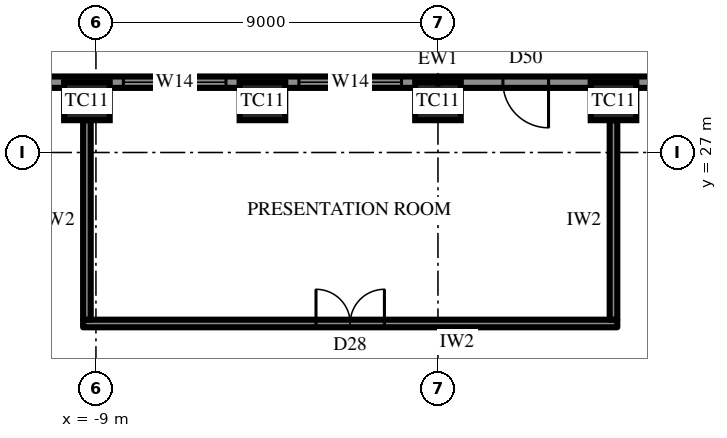
"""IFC4 building model, lengths in metres.
Left out: names, types, materials, properties, quantities, classifications, styles, units other than length and angle.
Written with IfcOpenShell. Run it as: python <this file> out.ifc"""

import sys

from ifc_helpers import new_model, si_unit, direction, frame, frame_2d, origin, origin_2d, place, context, subcontext, project, spatial, rectangle, extrude, element, fill, save


model = new_model("IFC4")
c1 = context("Model", 3, precision=1e-05, world=origin(), true_north=direction((0.0, 1.0)))
c2 = subcontext(c1, "Body", "Model", "MODEL_VIEW")
j1 = project(units=[si_unit("LENGTHUNIT", "METRE"), si_unit("PLANEANGLEUNIT", "RADIAN")], contexts=[c1])
p1 = place(None, origin())
s1 = spatial("IfcSite", under=j1, at=p1, CompositionType="ELEMENT")
p2 = place(p1, origin())
s2 = spatial("IfcBuilding", under=s1, at=p2, CompositionType="ELEMENT")
p3 = place(p2, frame((0.0, 0.0, 274.3)))
s3 = spatial("IfcBuildingStorey", under=s2, at=p3, CompositionType="ELEMENT", Elevation=274.3)
for number, where, z_axis, x_axis in (
    (1, (4.619, 28.35, 0.0), (0.0, 0.0, 1.0), (-1.0, 0.0, 0.0)),
    (2, (0.0, 28.35, 0.0), (0.0, 0.0, 1.0), (-1.0, 0.0, 0.0)),
    (3, (-4.619, 28.35, 0.0), (0.0, 0.0, 1.0), (-1.0, 0.0, 0.0)),
    (4, (-9.238, 28.35, 0.0), (0.0, 0.0, 1.0), (-1.0, 0.0, 0.0)),
):
    element("IfcColumn", number, at=place(p3, frame(where, z_axis=z_axis, x_axis=x_axis)), inside=s3, PredefinedType="COLUMN", context=c2, shape_type="SweptSolid", body=[
        extrude(rectangle(XDim=1.2, YDim=1.0, at=origin_2d()), origin(), (0.0, 0.0, 1.0), 4.2),
    ])
p4 = place(p3, frame((12.556, 28.85, 0.0), z_axis=(0.0, 0.0, 1.0), x_axis=(-1.0, 0.0, 0.0)))
e5 = element("IfcWall", 5, at=p4, inside=s3, PredefinedType="SOLIDWALL", context=c2, shape_type="SweptSolid", body=[
    extrude(rectangle(XDim=25.113, YDim=0.3, at=frame_2d((12.556, 0.0))), origin(), (0.0, 0.0, 1.0), 2.8),
])
p5 = place(p4, frame((4.278, 0.0, 0.6)))
e6 = element("IfcOpeningElement", 6, at=p5, cuts=e5, PredefinedType="OPENING", context=c2, shape_type="SweptSolid", body=[
    extrude(rectangle(XDim=2.7, YDim=1.95, at=frame_2d((1.35, 0.975))), frame((0.0, 0.16, 0.0), z_axis=(0.0, -1.0, 0.0), x_axis=(1.0, 0.0, 0.0)), (0.0, 0.0, 1.0), 0.32),
])
p6 = place(p4, frame((9.647, 0.0, 0.0)))
e7 = element("IfcOpeningElement", 7, at=p6, cuts=e5, PredefinedType="OPENING", context=c2, shape_type="SweptSolid", body=[
    extrude(rectangle(XDim=1.2, YDim=2.4, at=frame_2d((0.6, 1.2))), frame((0.0, 0.16, 0.0), z_axis=(0.0, -1.0, 0.0), x_axis=(1.0, 0.0, 0.0)), (0.0, 0.0, 1.0), 0.32),
])
p7 = place(p4, frame((13.516, 0.0, 0.6)))
e8 = element("IfcOpeningElement", 8, at=p7, cuts=e5, PredefinedType="OPENING", context=c2, shape_type="SweptSolid", body=[
    extrude(rectangle(XDim=2.7, YDim=1.95, at=frame_2d((1.35, 0.975))), frame((0.0, 0.16, 0.0), z_axis=(0.0, -1.0, 0.0), x_axis=(1.0, 0.0, 0.0)), (0.0, 0.0, 1.0), 0.32),
])
p8 = place(p4, frame((18.135, 0.0, 0.6)))
e9 = element("IfcOpeningElement", 9, at=p8, cuts=e5, PredefinedType="OPENING", context=c2, shape_type="SweptSolid", body=[
    extrude(rectangle(XDim=2.7, YDim=1.95, at=frame_2d((1.35, 0.975))), frame((0.0, 0.16, 0.0), z_axis=(0.0, -1.0, 0.0), x_axis=(1.0, 0.0, 0.0)), (0.0, 0.0, 1.0), 0.32),
])
p9 = place(p3, frame((4.719, 22.5, 0.0), z_axis=(0.0, 0.0, 1.0), x_axis=(-1.0, 0.0, 0.0)))
e10 = element("IfcWall", 10, at=p9, inside=s3, PredefinedType="PARTITIONING", context=c2, shape_type="SweptSolid", body=[
    extrude(rectangle(XDim=14.056, YDim=0.2, at=frame_2d((7.028, 0.0))), origin(), (0.0, 0.0, 1.0), 4.0),
])
p10 = place(p9, frame((6.128, 0.0, 0.0)))
e11 = element("IfcOpeningElement", 11, at=p10, cuts=e10, PredefinedType="OPENING", context=c2, shape_type="SweptSolid", body=[
    extrude(rectangle(XDim=1.8, YDim=2.4, at=frame_2d((0.9, 1.2))), frame((0.0, 0.11, 0.0), z_axis=(0.0, -1.0, 0.0), x_axis=(1.0, 0.0, 0.0)), (0.0, 0.0, 1.0), 0.22),
])
for number, where, z_axis, x_axis in (
    (12, (4.619, 22.6, 0.0), (0.0, 0.0, 1.0), (0.0, 1.0, 0.0)),
    (13, (-9.238, 22.6, 0.0), (0.0, 0.0, 1.0), (0.0, 1.0, 0.0)),
):
    element("IfcWall", number, at=place(p3, frame(where, z_axis=z_axis, x_axis=x_axis)), inside=s3, PredefinedType="PARTITIONING", context=c2, shape_type="SweptSolid", body=[
        extrude(rectangle(XDim=5.25, YDim=0.2, at=frame_2d((2.625, 0.0))), origin(), (0.0, 0.0, 1.0), 2.992),
    ])
p11 = place(p6, origin())
e14 = element("IfcDoor", 14, at=p11, inside=s3, OperationType="SINGLE_SWING_RIGHT", PredefinedType="DOOR", context=c2, shape_type="SweptSolid", body=[
    extrude(rectangle(XDim=1.2, YDim=2.4, at=frame_2d((0.6, 1.2))), frame((0.0, 0.025, 0.0), z_axis=(0.0, -1.0, 0.0), x_axis=(1.0, 0.0, 0.0)), (0.0, 0.0, 1.0), 0.05),
])
fill(e7, e14)
p12 = place(p7, origin())
e15 = element("IfcWindow", 15, at=p12, inside=s3, PartitioningType="SINGLE_PANEL", PredefinedType="WINDOW", context=c2, shape_type="SweptSolid", body=[
    extrude(rectangle(XDim=2.7, YDim=1.95, at=frame_2d((1.35, 0.975))), frame((0.0, 0.03, 0.0), z_axis=(0.0, -1.0, 0.0), x_axis=(1.0, 0.0, 0.0)), (0.0, 0.0, 1.0), 0.06),
])
fill(e8, e15)
p13 = place(p8, origin())
e16 = element("IfcWindow", 16, at=p13, inside=s3, PartitioningType="SINGLE_PANEL", PredefinedType="WINDOW", context=c2, shape_type="SweptSolid", body=[
    extrude(rectangle(XDim=2.7, YDim=1.95, at=frame_2d((1.35, 0.975))), frame((0.0, 0.03, 0.0), z_axis=(0.0, -1.0, 0.0), x_axis=(1.0, 0.0, 0.0)), (0.0, 0.0, 1.0), 0.06),
])
fill(e9, e16)
p14 = place(p10, frame((1.8, 0.0, 0.0), z_axis=(0.0, 0.0, 1.0), x_axis=(-1.0, 0.0, 0.0)))
e17 = element("IfcDoor", 17, at=p14, inside=s3, OperationType="DOUBLE_DOOR_SINGLE_SWING", PredefinedType="DOOR", context=c2, shape_type="SweptSolid", body=[
    extrude(rectangle(XDim=1.8, YDim=2.4, at=frame_2d((0.9, 1.2))), frame((0.0, 0.025, 0.0), z_axis=(0.0, -1.0, 0.0), x_axis=(1.0, 0.0, 0.0)), (0.0, 0.0, 1.0), 0.05),
])
fill(e11, e17)
save(model, sys.argv[1])
